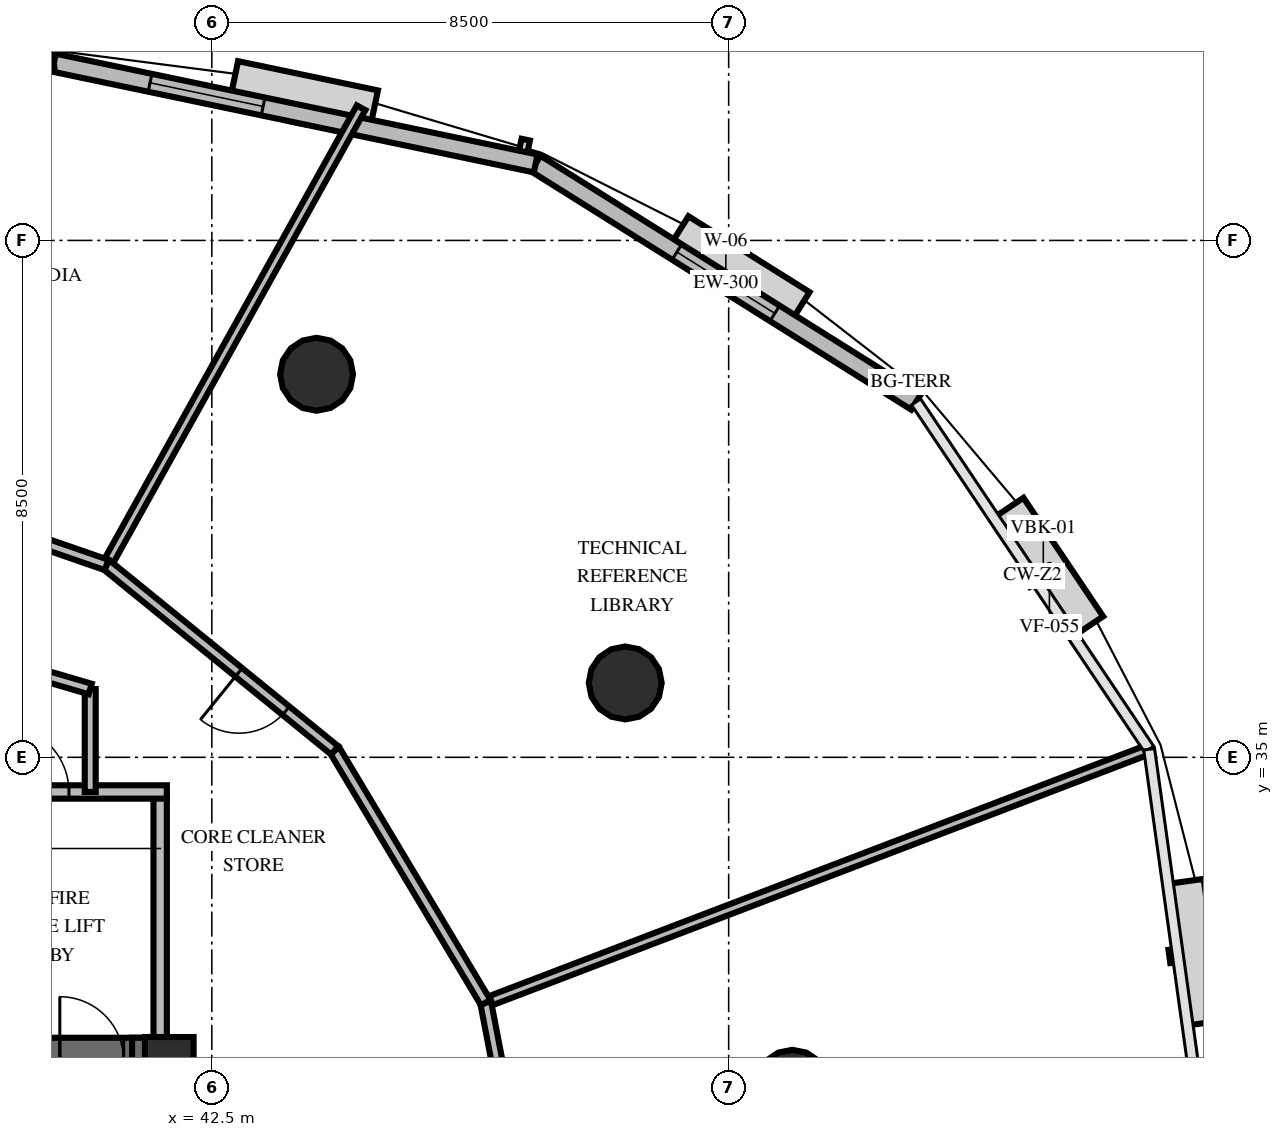
"""IFC4 building model, lengths in metres.
Left out: names, types, materials, properties, quantities, classifications, styles, units other than length and angle.
Written with IfcOpenShell. Run it as: python <this file> out.ifc"""

import sys

from ifc_helpers import new_model, si_unit, direction, frame, frame_2d, origin, origin_2d, place, context, subcontext, project, spatial, rectangle, circle, extrude, element, fill, save


model = new_model("IFC4")
c1 = context("Model", 3, precision=1e-05, world=origin(), true_north=direction((0.0, 1.0)))
c2 = subcontext(c1, "Body", "Model", "MODEL_VIEW")
j1 = project(units=[si_unit("LENGTHUNIT", "METRE"), si_unit("PLANEANGLEUNIT", "RADIAN")], contexts=[c1])
p1 = place(None, origin())
s1 = spatial("IfcSite", under=j1, at=p1, CompositionType="ELEMENT")
p2 = place(p1, origin())
s2 = spatial("IfcBuilding", under=s1, at=p2, CompositionType="ELEMENT")
p3 = place(p2, frame((0.0, 0.0, 121.8)))
s3 = spatial("IfcBuildingStorey", under=s2, at=p3, CompositionType="ELEMENT", Elevation=121.8)
p4 = place(p3, frame((26.072, 30.013, 0.0), z_axis=(0.0, 0.0, 1.0), x_axis=(1.0, 0.0, 0.0)))
e1 = element("IfcWall", 1, at=p4, inside=s3, PredefinedType="SHEAR", context=c2, shape_type="SweptSolid", body=[
    extrude(rectangle(XDim=15.866, YDim=0.75, at=frame_2d((7.933, 0.0))), origin(), (0.0, 0.0, 1.0), 4.0),
])
p5 = place(p4, frame((0.878, 0.0, 0.0)))
e2 = element("IfcOpeningElement", 2, at=p5, cuts=e1, PredefinedType="OPENING", context=c2, shape_type="SweptSolid", body=[
    extrude(rectangle(XDim=1.05, YDim=2.15, at=frame_2d((0.525, 1.075))), frame((0.0, 0.385, 0.0), z_axis=(0.0, -1.0, 0.0), x_axis=(1.0, 0.0, 0.0)), (0.0, 0.0, 1.0), 0.77),
])
p6 = place(p4, frame((13.928, 0.0, 0.0)))
e3 = element("IfcOpeningElement", 3, at=p6, cuts=e1, PredefinedType="OPENING", context=c2, shape_type="SweptSolid", body=[
    extrude(rectangle(XDim=1.05, YDim=2.15, at=frame_2d((0.525, 1.075))), frame((0.0, 0.385, 0.0), z_axis=(0.0, -1.0, 0.0), x_axis=(1.0, 0.0, 0.0)), (0.0, 0.0, 1.0), 0.77),
])
p7 = place(p4, frame((7.378, 0.0, 0.0)))
e4 = element("IfcOpeningElement", 4, at=p7, cuts=e1, PredefinedType="OPENING", context=c2, shape_type="SweptSolid", body=[
    extrude(rectangle(XDim=1.1, YDim=2.15, at=frame_2d((0.55, 1.075))), frame((0.0, 0.385, 0.0), z_axis=(0.0, -1.0, 0.0), x_axis=(1.0, 0.0, 0.0)), (0.0, 0.0, 1.0), 0.77),
])
p8 = place(p3, frame((41.563, 19.812, 0.0), z_axis=(0.0, 0.0, 1.0), x_axis=(0.0, 1.0, 0.0)))
e5 = element("IfcWall", 5, at=p8, inside=s3, PredefinedType="SHEAR", context=c2, shape_type="SweptSolid", body=[
    extrude(rectangle(XDim=10.576, YDim=0.75, at=frame_2d((5.288, 0.0))), origin(), (0.0, 0.0, 1.0), 4.0),
])
p9 = place(p3, frame((41.8, 30.0, 0.0), z_axis=(0.0, 0.0, 1.0), x_axis=(1.0, 0.0, 0.0)))
e6 = element("IfcColumn", 6, at=p9, inside=s3, PredefinedType="PILASTER", context=c2, shape_type="SweptSolid", body=[
    extrude(rectangle(XDim=0.8, YDim=0.8, at=origin_2d()), origin(), (0.0, 0.0, 1.0), 4.0),
])
for number, where, z_axis, x_axis in (
    (7, (52.046, 29.59, 0.0), (0.0, 0.0, 1.0), (1.0, 0.0, 0.0)),
    (8, (49.299, 36.222, 0.0), (0.0, 0.0, 1.0), (1.0, 0.0, 0.0)),
    (9, (44.222, 41.299, 0.0), (0.0, 0.0, 1.0), (1.0, 0.0, 0.0)),
):
    element("IfcColumn", number, at=place(p3, frame(where, z_axis=z_axis, x_axis=x_axis)), inside=s3, PredefinedType="COLUMN", context=c2, shape_type="SweptSolid", body=[
        extrude(circle(Radius=0.6, at=origin_2d()), origin(), (0.0, 0.0, 1.0), 4.0),
    ])
p10 = place(p3, frame((54.082, 40.844, 0.0), z_axis=(0.0, 0.0, 1.0), x_axis=(-0.847299081662, 0.531116057199, 0.0)))
e10 = element("IfcWall", 10, at=p10, inside=s3, PredefinedType="SOLIDWALL", context=c2, shape_type="SweptSolid", body=[
    extrude(rectangle(XDim=7.383, YDim=0.3, at=frame_2d((3.692, 0.0))), origin(), (0.0, 0.0, 1.0), 2.9),
])
p11 = place(p10, frame((2.742, 0.0, 0.8)))
e11 = element("IfcOpeningElement", 11, at=p11, cuts=e10, PredefinedType="OPENING", context=c2, shape_type="SweptSolid", body=[
    extrude(rectangle(XDim=1.9, YDim=1.95, at=frame_2d((0.95, 0.975))), frame((0.0, 0.16, 0.0), z_axis=(0.0, -1.0, 0.0), x_axis=(1.0, 0.0, 0.0)), (0.0, 0.0, 1.0), 0.32),
])
p12 = place(p3, frame((47.826, 44.766, 0.0), z_axis=(0.0, 0.0, 1.0), x_axis=(-0.978800890802, 0.20481410148, 0.0)))
e12 = element("IfcWall", 12, at=p12, inside=s3, PredefinedType="SOLIDWALL", context=c2, shape_type="SweptSolid", body=[
    extrude(rectangle(XDim=8.095, YDim=0.3, at=frame_2d((4.047, 0.0))), origin(), (0.0, 0.0, 1.0), 2.9),
])
p13 = place(p12, frame((4.58, 0.0, 0.8)))
e13 = element("IfcOpeningElement", 13, at=p13, cuts=e12, PredefinedType="OPENING", context=c2, shape_type="SweptSolid", body=[
    extrude(rectangle(XDim=1.9, YDim=1.95, at=frame_2d((0.95, 0.975))), frame((0.0, 0.16, 0.0), z_axis=(0.0, -1.0, 0.0), x_axis=(1.0, 0.0, 0.0)), (0.0, 0.0, 1.0), 0.32),
])
p14 = place(p3, frame((39.903, 46.424, 0.0), z_axis=(0.0, 0.0, 1.0), x_axis=(-0.995678666902, -0.092865452549, 0.0)))
e14 = element("IfcWall", 14, at=p14, inside=s3, PredefinedType="SOLIDWALL", context=c2, shape_type="SweptSolid", body=[
    extrude(rectangle(XDim=8.673, YDim=0.3, at=frame_2d((4.336, 0.0))), origin(), (0.0, 0.0, 1.0), 2.9),
])
p15 = place(p14, frame((3.386, 0.0, 0.8)))
e15 = element("IfcOpeningElement", 15, at=p15, cuts=e14, PredefinedType="OPENING", context=c2, shape_type="SweptSolid", body=[
    extrude(rectangle(XDim=1.9, YDim=1.95, at=frame_2d((0.95, 0.975))), frame((0.0, 0.16, 0.0), z_axis=(0.0, -1.0, 0.0), x_axis=(1.0, 0.0, 0.0)), (0.0, 0.0, 1.0), 0.32),
])
p16 = place(p3, frame((41.65, 30.05, 0.0), z_axis=(0.0, 0.0, 1.0), x_axis=(0.0, 1.0, 0.0)))
e16 = element("IfcWall", 16, at=p16, inside=s3, PredefinedType="SOLIDWALL", context=c2, shape_type="SweptSolid", body=[
    extrude(rectangle(XDim=4.38, YDim=0.22, at=frame_2d((2.19, 0.0))), origin(), (0.0, 0.0, 1.0), 2.8),
])
p17 = place(p3, frame((37.45, 34.43, 0.0), z_axis=(0.0, 0.0, 1.0), x_axis=(1.0, 0.0, 0.0)))
e17 = element("IfcWall", 17, at=p17, inside=s3, PredefinedType="SOLIDWALL", context=c2, shape_type="SweptSolid", body=[
    extrude(rectangle(XDim=4.31, YDim=0.22, at=frame_2d((2.155, 0.0))), origin(), (0.0, 0.0, 1.0), 2.8),
])
p18 = place(p17, frame((1.6, 0.0, 0.0)))
e18 = element("IfcOpeningElement", 18, at=p18, cuts=e17, PredefinedType="OPENING", context=c2, shape_type="SweptSolid", body=[
    extrude(rectangle(XDim=1.1, YDim=2.15, at=frame_2d((0.55, 1.075))), frame((0.0, 0.12, 0.0), z_axis=(0.0, -1.0, 0.0), x_axis=(1.0, 0.0, 0.0)), (0.0, 0.0, 1.0), 0.24),
])
p19 = place(p3, frame((40.5, 36.123, 0.0), z_axis=(0.0, 0.0, 1.0), x_axis=(0.0, -1.0, 0.0)))
e19 = element("IfcWall", 19, at=p19, inside=s3, PredefinedType="PARTITIONING", context=c2, shape_type="SweptSolid", body=[
    extrude(rectangle(XDim=1.693, YDim=0.18, at=frame_2d((0.846, 0.0))), origin(), (0.0, 0.0, 1.0), 2.8),
])
p20 = place(p3, frame((34.0, 38.03, 0.0), z_axis=(0.0, 0.0, 1.0), x_axis=(0.959546654541, -0.281549671923, 0.0)))
e20 = element("IfcWall", 20, at=p20, inside=s3, PredefinedType="PARTITIONING", context=c2, shape_type="SweptSolid", body=[
    extrude(rectangle(XDim=6.774, YDim=0.18, at=frame_2d((3.387, 0.0))), origin(), (0.0, 0.0, 1.0), 2.8),
])
p21 = place(p20, frame((2.837, 0.0, 0.0)))
e21 = element("IfcOpeningElement", 21, at=p21, cuts=e20, PredefinedType="OPENING", context=c2, shape_type="SweptSolid", body=[
    extrude(rectangle(XDim=1.1, YDim=2.15, at=frame_2d((0.55, 1.075))), frame((0.0, 0.1, 0.0), z_axis=(0.0, -1.0, 0.0), x_axis=(1.0, 0.0, 0.0)), (0.0, 0.0, 1.0), 0.2),
])
p22 = place(p3, frame((47.004, 30.966, 0.0), z_axis=(0.0, 0.0, 1.0), x_axis=(0.934201667866, 0.356745348611, 0.0)))
e22 = element("IfcWall", 22, at=p22, inside=s3, PredefinedType="PARTITIONING", context=c2, shape_type="SweptSolid", body=[
    extrude(rectangle(XDim=11.68, YDim=0.16, at=frame_2d((5.84, 0.0))), origin(), (0.0, 0.0, 1.0), 2.8),
])
p23 = place(p3, frame((47.918, 26.219, 0.0), z_axis=(0.0, 0.0, 1.0), x_axis=(-0.18907027834, 0.98196355831, 0.0)))
e23 = element("IfcWall", 23, at=p23, inside=s3, PredefinedType="PARTITIONING", context=c2, shape_type="SweptSolid", body=[
    extrude(rectangle(XDim=4.834, YDim=0.18, at=frame_2d((2.417, 0.0))), origin(), (0.0, 0.0, 1.0), 2.8),
])
p24 = place(p3, frame((40.77, 38.163, 0.0), z_axis=(0.0, 0.0, 1.0), x_axis=(0.486326925852, 0.873776928736, 0.0)))
e24 = element("IfcWall", 24, at=p24, inside=s3, PredefinedType="PARTITIONING", context=c2, shape_type="SweptSolid", body=[
    extrude(rectangle(XDim=8.605, YDim=0.16, at=frame_2d((4.302, 0.0))), origin(), (0.0, 0.0, 1.0), 2.8),
])
p25 = place(p3, frame((47.004, 30.966, 0.0), z_axis=(0.0, 0.0, 1.0), x_axis=(-0.513544831917, 0.858062763212, 0.0)))
e25 = element("IfcWall", 25, at=p25, inside=s3, PredefinedType="PARTITIONING", context=c2, shape_type="SweptSolid", body=[
    extrude(rectangle(XDim=4.834, YDim=0.18, at=frame_2d((2.417, 0.0))), origin(), (0.0, 0.0, 1.0), 2.8),
])
p26 = place(p3, frame((44.521, 35.114, 0.0), z_axis=(0.0, 0.0, 1.0), x_axis=(-0.776056841092, 0.630662968149, 0.0)))
e26 = element("IfcWall", 26, at=p26, inside=s3, PredefinedType="PARTITIONING", context=c2, shape_type="SweptSolid", body=[
    extrude(rectangle(XDim=4.834, YDim=0.18, at=frame_2d((2.417, 0.0))), origin(), (0.0, 0.0, 1.0), 2.8),
])
p27 = place(p26, frame((1.034, 0.0, 0.0)))
e27 = element("IfcOpeningElement", 27, at=p27, cuts=e26, PredefinedType="OPENING", context=c2, shape_type="SweptSolid", body=[
    extrude(rectangle(XDim=1.0, YDim=2.15, at=frame_2d((0.5, 1.075))), frame((0.0, 0.1, 0.0), z_axis=(0.0, -1.0, 0.0), x_axis=(1.0, 0.0, 0.0)), (0.0, 0.0, 1.0), 0.2),
])
p28 = place(p3, frame((40.77, 38.163, 0.0), z_axis=(0.0, 0.0, 1.0), x_axis=(-0.944937429252, 0.32725105775, 0.0)))
e28 = element("IfcWall", 28, at=p28, inside=s3, PredefinedType="PARTITIONING", context=c2, shape_type="SweptSolid", body=[
    extrude(rectangle(XDim=4.834, YDim=0.18, at=frame_2d((2.417, 0.0))), origin(), (0.0, 0.0, 1.0), 2.8),
])
p29 = place(p28, frame((1.034, 0.0, 0.0)))
e29 = element("IfcOpeningElement", 29, at=p29, cuts=e28, PredefinedType="OPENING", context=c2, shape_type="SweptSolid", body=[
    extrude(rectangle(XDim=1.0, YDim=2.15, at=frame_2d((0.5, 1.075))), frame((0.0, 0.1, 0.0), z_axis=(0.0, -1.0, 0.0), x_axis=(1.0, 0.0, 0.0)), (0.0, 0.0, 1.0), 0.2),
])
p30 = place(p11, origin())
e30 = element("IfcWindow", 30, at=p30, inside=s3, PartitioningType="SINGLE_PANEL", PredefinedType="WINDOW", context=c2, shape_type="SweptSolid", body=[
    extrude(rectangle(XDim=1.9, YDim=1.95, at=frame_2d((0.95, 0.975))), frame((0.0, 0.03, 0.0), z_axis=(0.0, -1.0, 0.0), x_axis=(1.0, 0.0, 0.0)), (0.0, 0.0, 1.0), 0.06),
])
fill(e11, e30)
p31 = place(p13, origin())
e31 = element("IfcWindow", 31, at=p31, inside=s3, PartitioningType="SINGLE_PANEL", PredefinedType="WINDOW", context=c2, shape_type="SweptSolid", body=[
    extrude(rectangle(XDim=1.9, YDim=1.95, at=frame_2d((0.95, 0.975))), frame((0.0, 0.03, 0.0), z_axis=(0.0, -1.0, 0.0), x_axis=(1.0, 0.0, 0.0)), (0.0, 0.0, 1.0), 0.06),
])
fill(e13, e31)
p32 = place(p18, origin())
e32 = element("IfcDoor", 32, at=p32, inside=s3, OperationType="SINGLE_SWING_LEFT", PredefinedType="DOOR", context=c2, shape_type="SweptSolid", body=[
    extrude(rectangle(XDim=1.1, YDim=2.15, at=frame_2d((0.55, 1.075))), frame((0.0, 0.025, 0.0), z_axis=(0.0, -1.0, 0.0), x_axis=(1.0, 0.0, 0.0)), (0.0, 0.0, 1.0), 0.05),
])
fill(e18, e32)
p33 = place(p27, origin())
e33 = element("IfcDoor", 33, at=p33, inside=s3, OperationType="SINGLE_SWING_RIGHT", PredefinedType="DOOR", context=c2, shape_type="SweptSolid", body=[
    extrude(rectangle(XDim=1.0, YDim=2.15, at=frame_2d((0.5, 1.075))), frame((0.0, 0.025, 0.0), z_axis=(0.0, -1.0, 0.0), x_axis=(1.0, 0.0, 0.0)), (0.0, 0.0, 1.0), 0.05),
])
fill(e27, e33)
save(model, sys.argv[1])
